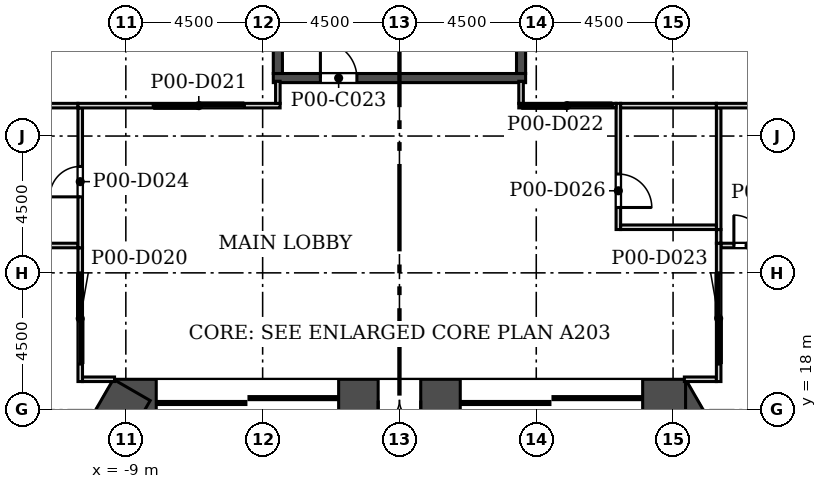
"""IFC4 building model, lengths in metres.
Left out: names, types, materials, properties, quantities, classifications, styles, units other than length and angle.
Written with IfcOpenShell. Run it as: python <this file> out.ifc"""

import sys

from ifc_helpers import new_model, si_unit, direction, frame, frame_2d, origin, place, context, subcontext, project, spatial, rectangle, extrude, element, fill, save


model = new_model("IFC4")
c1 = context("Model", 3, precision=1e-05, world=origin(), true_north=direction((0.0, 1.0)))
c2 = subcontext(c1, "Body", "Model", "MODEL_VIEW")
j1 = project(units=[si_unit("LENGTHUNIT", "METRE"), si_unit("PLANEANGLEUNIT", "RADIAN")], contexts=[c1])
p1 = place(None, origin())
s1 = spatial("IfcSite", under=j1, at=p1, CompositionType="ELEMENT")
p2 = place(p1, origin())
s2 = spatial("IfcBuilding", under=s1, at=p2, CompositionType="ELEMENT")
p3 = place(p2, origin())
s3 = spatial("IfcBuildingStorey", under=s2, at=p3, CompositionType="ELEMENT", Elevation=0.0)
p4 = place(p3, frame((13.394, 10.703, 0.0), z_axis=(0.0, 0.0, 1.0), x_axis=(-0.50000187635, 0.866024320471, 0.0)))
e1 = element("IfcWall", 1, at=p4, inside=s3, PredefinedType="SHEAR", context=c2, shape_type="SweptSolid", body=[
    extrude(rectangle(XDim=9.177, YDim=1.4, at=frame_2d((4.588, 0.0))), origin(), (0.0, 0.0, 1.0), 8.0),
])
p5 = place(p3, frame((9.412, 18.3, 0.0), z_axis=(0.0, 0.0, 1.0), x_axis=(-1.0, 0.0, 0.0)))
e2 = element("IfcWall", 2, at=p5, inside=s3, PredefinedType="SHEAR", context=c2, shape_type="SweptSolid", body=[
    extrude(rectangle(XDim=18.823, YDim=1.4, at=frame_2d((9.412, 0.0))), origin(), (0.0, 0.0, 1.0), 8.0),
])
p6 = place(p5, frame((8.711, 0.0, 0.0)))
e3 = element("IfcOpeningElement", 3, at=p6, cuts=e2, PredefinedType="OPENING", context=c2, shape_type="SweptSolid", body=[
    extrude(rectangle(XDim=1.4, YDim=2.1, at=frame_2d((0.7, 1.05))), frame((0.0, 0.71, 0.0), z_axis=(0.0, -1.0, 0.0), x_axis=(1.0, 0.0, 0.0)), (0.0, 0.0, 1.0), 1.42),
])
p7 = place(p5, frame((11.412, 0.0, 0.0)))
e4 = element("IfcOpeningElement", 4, at=p7, cuts=e2, PredefinedType="OPENING", context=c2, shape_type="SweptSolid", body=[
    extrude(rectangle(XDim=6.0, YDim=2.4, at=frame_2d((3.0, 1.2))), frame((0.0, 0.71, 0.0), z_axis=(0.0, -1.0, 0.0), x_axis=(1.0, 0.0, 0.0)), (0.0, 0.0, 1.0), 1.42),
])
p8 = place(p5, frame((1.412, 0.0, 0.0)))
e5 = element("IfcOpeningElement", 5, at=p8, cuts=e2, PredefinedType="OPENING", context=c2, shape_type="SweptSolid", body=[
    extrude(rectangle(XDim=6.0, YDim=2.4, at=frame_2d((3.0, 1.2))), frame((0.0, 0.71, 0.0), z_axis=(0.0, -1.0, 0.0), x_axis=(1.0, 0.0, 0.0)), (0.0, 0.0, 1.0), 1.42),
])
p9 = place(p3, frame((-8.805, 18.65, 0.0), z_axis=(0.0, 0.0, 1.0), x_axis=(-0.50000187635, -0.866024320471, 0.0)))
e6 = element("IfcWall", 6, at=p9, inside=s3, PredefinedType="SHEAR", context=c2, shape_type="SweptSolid", body=[
    extrude(rectangle(XDim=9.177, YDim=1.4, at=frame_2d((4.588, 0.0))), origin(), (0.0, 0.0, 1.0), 8.0),
])
p10 = place(p3, frame((-4.853, 74.393, 0.0), z_axis=(0.0, 0.0, 1.0), x_axis=(-0.499999725439, -0.866025562302, 0.0)))
e7 = element("IfcWall", 7, at=p10, inside=s3, PredefinedType="SOLIDWALL", context=c2, shape_type="SweptSolid", body=[
    extrude(rectangle(XDim=52.058, YDim=0.34, at=frame_2d((26.029, 0.0))), origin(), (0.0, 0.0, 1.0), 7.7),
])
p11 = place(p10, frame((19.058, 0.0, 0.9)))
e8 = element("IfcOpeningElement", 8, at=p11, cuts=e7, PredefinedType="OPENING", context=c2, shape_type="SweptSolid", body=[
    extrude(rectangle(XDim=1.885, YDim=3.5, at=frame_2d((0.942, 1.75))), frame((0.0, 0.18, 0.0), z_axis=(0.0, -1.0, 0.0), x_axis=(1.0, 0.0, 0.0)), (0.0, 0.0, 1.0), 0.36),
])
p12 = place(p10, frame((22.058, 0.0, 0.9)))
e9 = element("IfcOpeningElement", 9, at=p12, cuts=e7, PredefinedType="OPENING", context=c2, shape_type="SweptSolid", body=[
    extrude(rectangle(XDim=1.885, YDim=3.5, at=frame_2d((0.942, 1.75))), frame((0.0, 0.18, 0.0), z_axis=(0.0, -1.0, 0.0), x_axis=(1.0, 0.0, 0.0)), (0.0, 0.0, 1.0), 0.36),
])
p13 = place(p10, frame((40.058, 0.0, 0.9)))
e10 = element("IfcOpeningElement", 10, at=p13, cuts=e7, PredefinedType="OPENING", context=c2, shape_type="SweptSolid", body=[
    extrude(rectangle(XDim=1.885, YDim=3.5, at=frame_2d((0.942, 1.75))), frame((0.0, 0.18, 0.0), z_axis=(0.0, -1.0, 0.0), x_axis=(1.0, 0.0, 0.0)), (0.0, 0.0, 1.0), 0.36),
])
p14 = place(p10, frame((43.058, 0.0, 0.9)))
e11 = element("IfcOpeningElement", 11, at=p14, cuts=e7, PredefinedType="OPENING", context=c2, shape_type="SweptSolid", body=[
    extrude(rectangle(XDim=1.885, YDim=3.5, at=frame_2d((0.942, 1.75))), frame((0.0, 0.18, 0.0), z_axis=(0.0, -1.0, 0.0), x_axis=(1.0, 0.0, 0.0)), (0.0, 0.0, 1.0), 0.36),
])
p15 = place(p10, frame((48.279, 0.0, 0.0)))
e12 = element("IfcOpeningElement", 12, at=p15, cuts=e7, PredefinedType="OPENING", context=c2, shape_type="SweptSolid", body=[
    extrude(rectangle(XDim=2.4, YDim=2.7, at=frame_2d((1.2, 1.35))), frame((0.0, 0.18, 0.0), z_axis=(0.0, -1.0, 0.0), x_axis=(1.0, 0.0, 0.0)), (0.0, 0.0, 1.0), 0.36),
])
p16 = place(p10, frame((36.8, 0.0, 0.0)))
e13 = element("IfcOpeningElement", 13, at=p16, cuts=e7, PredefinedType="OPENING", context=c2, shape_type="SweptSolid", body=[
    extrude(rectangle(XDim=2.4, YDim=2.7, at=frame_2d((1.2, 1.35))), frame((0.0, 0.18, 0.0), z_axis=(0.0, -1.0, 0.0), x_axis=(1.0, 0.0, 0.0)), (0.0, 0.0, 1.0), 0.36),
])
p17 = place(p10, frame((31.06, 0.0, 0.0)))
e14 = element("IfcOpeningElement", 14, at=p17, cuts=e7, PredefinedType="OPENING", context=c2, shape_type="SweptSolid", body=[
    extrude(rectangle(XDim=2.4, YDim=2.7, at=frame_2d((1.2, 1.35))), frame((0.0, 0.18, 0.0), z_axis=(0.0, -1.0, 0.0), x_axis=(1.0, 0.0, 0.0)), (0.0, 0.0, 1.0), 0.36),
])
p18 = place(p10, frame((25.321, 0.0, 0.0)))
e15 = element("IfcOpeningElement", 15, at=p18, cuts=e7, PredefinedType="OPENING", context=c2, shape_type="SweptSolid", body=[
    extrude(rectangle(XDim=2.4, YDim=2.7, at=frame_2d((1.2, 1.35))), frame((0.0, 0.18, 0.0), z_axis=(0.0, -1.0, 0.0), x_axis=(1.0, 0.0, 0.0)), (0.0, 0.0, 1.0), 0.36),
])
p19 = place(p10, frame((13.842, 0.0, 0.0)))
e16 = element("IfcOpeningElement", 16, at=p19, cuts=e7, PredefinedType="OPENING", context=c2, shape_type="SweptSolid", body=[
    extrude(rectangle(XDim=2.4, YDim=2.7, at=frame_2d((1.2, 1.35))), frame((0.0, 0.18, 0.0), z_axis=(0.0, -1.0, 0.0), x_axis=(1.0, 0.0, 0.0)), (0.0, 0.0, 1.0), 0.36),
])
p20 = place(p10, frame((8.102, 0.0, 0.0)))
e17 = element("IfcOpeningElement", 17, at=p20, cuts=e7, PredefinedType="OPENING", context=c2, shape_type="SweptSolid", body=[
    extrude(rectangle(XDim=2.4, YDim=2.7, at=frame_2d((1.2, 1.35))), frame((0.0, 0.18, 0.0), z_axis=(0.0, -1.0, 0.0), x_axis=(1.0, 0.0, 0.0)), (0.0, 0.0, 1.0), 0.36),
])
p21 = place(p10, frame((2.363, 0.0, 0.0)))
e18 = element("IfcOpeningElement", 18, at=p21, cuts=e7, PredefinedType="OPENING", context=c2, shape_type="SweptSolid", body=[
    extrude(rectangle(XDim=2.4, YDim=2.7, at=frame_2d((1.2, 1.35))), frame((0.0, 0.18, 0.0), z_axis=(0.0, -1.0, 0.0), x_axis=(1.0, 0.0, 0.0)), (0.0, 0.0, 1.0), 0.36),
])
p22 = place(p3, frame((-4.15, 28.907, -0.4), z_axis=(0.0, 0.0, 1.0), x_axis=(1.0, 0.0, 0.0)))
e19 = element("IfcWall", 19, at=p22, inside=s3, PredefinedType="SOLIDWALL", context=c2, shape_type="SweptSolid", body=[
    extrude(rectangle(XDim=8.3, YDim=0.3, at=frame_2d((4.15, 0.0))), origin(), (0.0, 0.0, 1.0), 8.1),
])
p23 = place(p22, frame((1.55, 0.0, 0.4)))
e20 = element("IfcOpeningElement", 20, at=p23, cuts=e19, PredefinedType="OPENING", context=c2, shape_type="SweptSolid", body=[
    extrude(rectangle(XDim=1.2, YDim=2.1, at=frame_2d((0.6, 1.05))), frame((0.0, 0.16, 0.0), z_axis=(0.0, -1.0, 0.0), x_axis=(1.0, 0.0, 0.0)), (0.0, 0.0, 1.0), 0.32),
])
for number, where, z_axis, x_axis in (
    (21, (-4.0, 29.057, -0.4), (0.0, 0.0, 1.0), (0.0, 1.0, 0.0)),
    (22, (4.0, 29.057, -0.4), (0.0, 0.0, 1.0), (0.0, 1.0, 0.0)),
):
    element("IfcWall", number, at=place(p3, frame(where, z_axis=z_axis, x_axis=x_axis)), inside=s3, PredefinedType="SOLIDWALL", context=c2, shape_type="SweptSolid", body=[
        extrude(rectangle(XDim=6.5, YDim=0.3, at=frame_2d((3.25, 0.0))), origin(), (0.0, 0.0, 1.0), 8.1),
    ])
p24 = place(p3, frame((-10.5, 18.925, 0.0), z_axis=(0.0, 0.0, 1.0), x_axis=(0.0, 1.0, 0.0)))
e23 = element("IfcWall", 23, at=p24, inside=s3, PredefinedType="PARTITIONING", context=c2, shape_type="SweptSolid", body=[
    extrude(rectangle(XDim=4.4, YDim=0.15, at=frame_2d((2.2, 0.0))), origin(), (0.0, 0.0, 1.0), 7.7),
])
p25 = place(p24, frame((0.575, 0.0, 0.0)))
e24 = element("IfcOpeningElement", 24, at=p25, cuts=e23, PredefinedType="OPENING", context=c2, shape_type="SweptSolid", body=[
    extrude(rectangle(XDim=3.0, YDim=2.4, at=frame_2d((1.5, 1.2))), frame((0.0, 0.085, 0.0), z_axis=(0.0, -1.0, 0.0), x_axis=(1.0, 0.0, 0.0)), (0.0, 0.0, 1.0), 0.17),
])
for number, where, z_axis, x_axis in (
    (25, (-9.371, 19.0, 0.0), (0.0, 0.0, 1.0), (-1.0, 0.0, 0.0)),
    (26, (10.425, 19.0, 0.0), (0.0, 0.0, 1.0), (-1.0, 0.0, 0.0)),
):
    element("IfcWall", number, at=place(p3, frame(where, z_axis=z_axis, x_axis=x_axis)), inside=s3, PredefinedType="PARTITIONING", context=c2, shape_type="SweptSolid", body=[
        extrude(rectangle(XDim=1.054, YDim=0.15, at=frame_2d((0.527, 0.0))), origin(), (0.0, 0.0, 1.0), 7.7),
    ])
p26 = place(p3, frame((-10.575, 23.4, 0.0), z_axis=(0.0, 0.0, 1.0), x_axis=(-1.0, 0.0, 0.0)))
e27 = element("IfcWall", 27, at=p26, inside=s3, PredefinedType="PARTITIONING", context=c2, shape_type="SweptSolid", body=[
    extrude(rectangle(XDim=2.0, YDim=0.15, at=frame_2d((1.0, 0.0))), origin(), (0.0, 0.0, 1.0), 7.7),
])
p27 = place(p3, frame((12.575, 23.4, 0.0), z_axis=(0.0, 0.0, 1.0), x_axis=(-1.0, 0.0, 0.0)))
e28 = element("IfcWall", 28, at=p27, inside=s3, PredefinedType="PARTITIONING", context=c2, shape_type="SweptSolid", body=[
    extrude(rectangle(XDim=2.0, YDim=0.15, at=frame_2d((1.0, 0.0))), origin(), (0.0, 0.0, 1.0), 7.7),
])
p28 = place(p27, frame((0.575, 0.0, 0.0)))
e29 = element("IfcOpeningElement", 29, at=p28, cuts=e28, PredefinedType="OPENING", context=c2, shape_type="SweptSolid", body=[
    extrude(rectangle(XDim=1.0, YDim=2.1, at=frame_2d((0.5, 1.05))), frame((0.0, 0.085, 0.0), z_axis=(0.0, -1.0, 0.0), x_axis=(1.0, 0.0, 0.0)), (0.0, 0.0, 1.0), 0.17),
])
p29 = place(p3, frame((10.5, 23.475, 0.0), z_axis=(0.0, 0.0, 1.0), x_axis=(0.0, -1.0, 0.0)))
e30 = element("IfcWall", 30, at=p29, inside=s3, PredefinedType="PARTITIONING", context=c2, shape_type="SweptSolid", body=[
    extrude(rectangle(XDim=4.55, YDim=0.15, at=frame_2d((2.275, 0.0))), origin(), (0.0, 0.0, 1.0), 7.7),
])
p30 = place(p29, frame((0.975, 0.0, 0.0)))
e31 = element("IfcOpeningElement", 31, at=p30, cuts=e30, PredefinedType="OPENING", context=c2, shape_type="SweptSolid", body=[
    extrude(rectangle(XDim=3.0, YDim=2.4, at=frame_2d((1.5, 1.2))), frame((0.0, 0.085, 0.0), z_axis=(0.0, -1.0, 0.0), x_axis=(1.0, 0.0, 0.0)), (0.0, 0.0, 1.0), 0.17),
])
p31 = place(p3, frame((10.5, 23.475, 0.0), z_axis=(0.0, 0.0, 1.0), x_axis=(0.0, 1.0, 0.0)))
e32 = element("IfcWall", 32, at=p31, inside=s3, PredefinedType="PARTITIONING", context=c2, shape_type="SweptSolid", body=[
    extrude(rectangle(XDim=0.45, YDim=0.15, at=frame_2d((0.225, 0.0))), origin(), (0.0, 0.0, 1.0), 7.7),
])
p32 = place(p3, frame((7.2, 23.925, 0.0), z_axis=(0.0, 0.0, 1.0), x_axis=(0.0, 1.0, 0.0)))
e33 = element("IfcWall", 33, at=p32, inside=s3, PredefinedType="PARTITIONING", context=c2, shape_type="SweptSolid", body=[
    extrude(rectangle(XDim=4.15, YDim=0.15, at=frame_2d((2.075, 0.0))), origin(), (0.0, 0.0, 1.0), 7.7),
])
p33 = place(p32, frame((0.725, 0.0, 0.0)))
e34 = element("IfcOpeningElement", 34, at=p33, cuts=e33, PredefinedType="OPENING", context=c2, shape_type="SweptSolid", body=[
    extrude(rectangle(XDim=1.1, YDim=2.1, at=frame_2d((0.55, 1.05))), frame((0.0, 0.085, 0.0), z_axis=(0.0, -1.0, 0.0), x_axis=(1.0, 0.0, 0.0)), (0.0, 0.0, 1.0), 0.17),
])
p34 = place(p3, frame((10.5, 23.925, 0.0), z_axis=(0.0, 0.0, 1.0), x_axis=(0.0, 1.0, 0.0)))
e35 = element("IfcWall", 35, at=p34, inside=s3, PredefinedType="PARTITIONING", context=c2, shape_type="SweptSolid", body=[
    extrude(rectangle(XDim=4.0, YDim=0.15, at=frame_2d((2.0, 0.0))), origin(), (0.0, 0.0, 1.0), 7.7),
])
p35 = place(p3, frame((10.425, 24.0, 0.0), z_axis=(0.0, 0.0, 1.0), x_axis=(-1.0, 0.0, 0.0)))
e36 = element("IfcWall", 36, at=p35, inside=s3, PredefinedType="PARTITIONING", context=c2, shape_type="SweptSolid", body=[
    extrude(rectangle(XDim=3.15, YDim=0.15, at=frame_2d((1.575, 0.0))), origin(), (0.0, 0.0, 1.0), 7.7),
])
p36 = place(p3, frame((-10.5, 27.925, 0.0), z_axis=(0.0, 0.0, 1.0), x_axis=(0.0, -1.0, 0.0)))
e37 = element("IfcWall", 37, at=p36, inside=s3, PredefinedType="PARTITIONING", context=c2, shape_type="SweptSolid", body=[
    extrude(rectangle(XDim=4.6, YDim=0.15, at=frame_2d((2.3, 0.0))), origin(), (0.0, 0.0, 1.0), 7.7),
])
p37 = place(p36, frame((1.925, 0.0, 0.0)))
e38 = element("IfcOpeningElement", 38, at=p37, cuts=e37, PredefinedType="OPENING", context=c2, shape_type="SweptSolid", body=[
    extrude(rectangle(XDim=1.0, YDim=2.1, at=frame_2d((0.5, 1.05))), frame((0.0, 0.085, 0.0), z_axis=(0.0, -1.0, 0.0), x_axis=(1.0, 0.0, 0.0)), (0.0, 0.0, 1.0), 0.17),
])
p38 = place(p3, frame((-15.075, 28.0, 0.0), z_axis=(0.0, 0.0, 1.0), x_axis=(1.0, 0.0, 0.0)))
e39 = element("IfcWall", 39, at=p38, inside=s3, PredefinedType="PARTITIONING", context=c2, shape_type="SweptSolid", body=[
    extrude(rectangle(XDim=4.5, YDim=0.15, at=frame_2d((2.25, 0.0))), origin(), (0.0, 0.0, 1.0), 7.7),
])
p39 = place(p3, frame((-10.575, 28.0, 0.0), z_axis=(0.0, 0.0, 1.0), x_axis=(1.0, 0.0, 0.0)))
e40 = element("IfcWall", 40, at=p39, inside=s3, PredefinedType="PARTITIONING", context=c2, shape_type="SweptSolid", body=[
    extrude(rectangle(XDim=6.65, YDim=0.15, at=frame_2d((3.325, 0.0))), origin(), (0.0, 0.0, 1.0), 7.7),
])
p40 = place(p39, frame((2.475, 0.0, 0.0)))
e41 = element("IfcOpeningElement", 41, at=p40, cuts=e40, PredefinedType="OPENING", context=c2, shape_type="SweptSolid", body=[
    extrude(rectangle(XDim=3.0, YDim=2.4, at=frame_2d((1.5, 1.2))), frame((0.0, 0.085, 0.0), z_axis=(0.0, -1.0, 0.0), x_axis=(1.0, 0.0, 0.0)), (0.0, 0.0, 1.0), 0.17),
])
p41 = place(p3, frame((3.925, 28.0, 0.0), z_axis=(0.0, 0.0, 1.0), x_axis=(1.0, 0.0, 0.0)))
e42 = element("IfcWall", 42, at=p41, inside=s3, PredefinedType="PARTITIONING", context=c2, shape_type="SweptSolid", body=[
    extrude(rectangle(XDim=3.2, YDim=0.15, at=frame_2d((1.6, 0.0))), origin(), (0.0, 0.0, 1.0), 7.7),
])
p42 = place(p41, frame((0.08, 0.0, 0.0)))
e43 = element("IfcOpeningElement", 43, at=p42, cuts=e42, PredefinedType="OPENING", context=c2, shape_type="SweptSolid", body=[
    extrude(rectangle(XDim=3.0, YDim=2.4, at=frame_2d((1.5, 1.2))), frame((0.0, 0.085, 0.0), z_axis=(0.0, -1.0, 0.0), x_axis=(1.0, 0.0, 0.0)), (0.0, 0.0, 1.0), 0.17),
])
p43 = place(p3, frame((7.275, 28.0, 0.0), z_axis=(0.0, 0.0, 1.0), x_axis=(1.0, 0.0, 0.0)))
e44 = element("IfcWall", 44, at=p43, inside=s3, PredefinedType="PARTITIONING", context=c2, shape_type="SweptSolid", body=[
    extrude(rectangle(XDim=3.15, YDim=0.15, at=frame_2d((1.575, 0.0))), origin(), (0.0, 0.0, 1.0), 7.7),
])
p44 = place(p3, frame((10.425, 28.0, 0.0), z_axis=(0.0, 0.0, 1.0), x_axis=(1.0, 0.0, 0.0)))
e45 = element("IfcWall", 45, at=p44, inside=s3, PredefinedType="PARTITIONING", context=c2, shape_type="SweptSolid", body=[
    extrude(rectangle(XDim=4.65, YDim=0.15, at=frame_2d((2.325, 0.0))), origin(), (0.0, 0.0, 1.0), 7.7),
])
for number, where, z_axis, x_axis in (
    (46, (-4.0, 28.075, 0.0), (0.0, 0.0, 1.0), (0.0, 1.0, 0.0)),
    (47, (4.0, 28.802, 0.0), (0.0, 0.0, 1.0), (0.0, -1.0, 0.0)),
):
    element("IfcWall", number, at=place(p3, frame(where, z_axis=z_axis, x_axis=x_axis)), inside=s3, PredefinedType="PARTITIONING", context=c2, shape_type="SweptSolid", body=[
        extrude(rectangle(XDim=0.727, YDim=0.15, at=frame_2d((0.364, 0.0))), origin(), (0.0, 0.0, 1.0), 7.7),
    ])
p45 = place(p6, origin())
e48 = element("IfcDoor", 48, at=p45, inside=s3, OperationType="DOUBLE_DOOR_SINGLE_SWING", PredefinedType="DOOR", context=c2, shape_type="SweptSolid", body=[
    extrude(rectangle(XDim=1.4, YDim=2.1, at=frame_2d((0.7, 1.05))), frame((0.0, 0.025, 0.0), z_axis=(0.0, -1.0, 0.0), x_axis=(1.0, 0.0, 0.0)), (0.0, 0.0, 1.0), 0.05),
])
fill(e3, e48)
p46 = place(p7, origin())
e49 = element("IfcDoor", 49, at=p46, inside=s3, OperationType="DOUBLE_DOOR_SLIDING", PredefinedType="DOOR", context=c2, shape_type="SweptSolid", body=[
    extrude(rectangle(XDim=6.0, YDim=2.4, at=frame_2d((3.0, 1.2))), frame((0.0, 0.025, 0.0), z_axis=(0.0, -1.0, 0.0), x_axis=(1.0, 0.0, 0.0)), (0.0, 0.0, 1.0), 0.05),
])
fill(e4, e49)
p47 = place(p8, origin())
e50 = element("IfcDoor", 50, at=p47, inside=s3, OperationType="DOUBLE_DOOR_SLIDING", PredefinedType="DOOR", context=c2, shape_type="SweptSolid", body=[
    extrude(rectangle(XDim=6.0, YDim=2.4, at=frame_2d((3.0, 1.2))), frame((0.0, 0.025, 0.0), z_axis=(0.0, -1.0, 0.0), x_axis=(1.0, 0.0, 0.0)), (0.0, 0.0, 1.0), 0.05),
])
fill(e5, e50)
p48 = place(p23, origin())
e51 = element("IfcDoor", 51, at=p48, inside=s3, OperationType="SINGLE_SWING_LEFT", PredefinedType="DOOR", context=c2, shape_type="SweptSolid", body=[
    extrude(rectangle(XDim=1.2, YDim=2.1, at=frame_2d((0.6, 1.05))), frame((0.0, 0.025, 0.0), z_axis=(0.0, -1.0, 0.0), x_axis=(1.0, 0.0, 0.0)), (0.0, 0.0, 1.0), 0.05),
])
fill(e20, e51)
p49 = place(p25, origin())
e52 = element("IfcDoor", 52, at=p49, inside=s3, OperationType="DOUBLE_DOOR_SLIDING", PredefinedType="DOOR", context=c2, shape_type="SweptSolid", body=[
    extrude(rectangle(XDim=3.0, YDim=2.4, at=frame_2d((1.5, 1.2))), frame((0.0, 0.025, 0.0), z_axis=(0.0, -1.0, 0.0), x_axis=(1.0, 0.0, 0.0)), (0.0, 0.0, 1.0), 0.05),
])
fill(e24, e52)
p50 = place(p40, origin())
e53 = element("IfcDoor", 53, at=p50, inside=s3, OperationType="DOUBLE_DOOR_SLIDING", PredefinedType="DOOR", context=c2, shape_type="SweptSolid", body=[
    extrude(rectangle(XDim=3.0, YDim=2.4, at=frame_2d((1.5, 1.2))), frame((0.0, 0.025, 0.0), z_axis=(0.0, -1.0, 0.0), x_axis=(1.0, 0.0, 0.0)), (0.0, 0.0, 1.0), 0.05),
])
fill(e41, e53)
p51 = place(p42, origin())
e54 = element("IfcDoor", 54, at=p51, inside=s3, OperationType="DOUBLE_DOOR_SLIDING", PredefinedType="DOOR", context=c2, shape_type="SweptSolid", body=[
    extrude(rectangle(XDim=3.0, YDim=2.4, at=frame_2d((1.5, 1.2))), frame((0.0, 0.025, 0.0), z_axis=(0.0, -1.0, 0.0), x_axis=(1.0, 0.0, 0.0)), (0.0, 0.0, 1.0), 0.05),
])
fill(e43, e54)
p52 = place(p30, origin())
e55 = element("IfcDoor", 55, at=p52, inside=s3, OperationType="DOUBLE_DOOR_SLIDING", PredefinedType="DOOR", context=c2, shape_type="SweptSolid", body=[
    extrude(rectangle(XDim=3.0, YDim=2.4, at=frame_2d((1.5, 1.2))), frame((0.0, 0.025, 0.0), z_axis=(0.0, -1.0, 0.0), x_axis=(1.0, 0.0, 0.0)), (0.0, 0.0, 1.0), 0.05),
])
fill(e31, e55)
p53 = place(p37, frame((1.0, 0.0, 0.0), z_axis=(0.0, 0.0, 1.0), x_axis=(-1.0, 0.0, 0.0)))
e56 = element("IfcDoor", 56, at=p53, inside=s3, OperationType="SINGLE_SWING_LEFT", PredefinedType="DOOR", context=c2, shape_type="SweptSolid", body=[
    extrude(rectangle(XDim=1.0, YDim=2.1, at=frame_2d((0.5, 1.05))), frame((0.0, 0.025, 0.0), z_axis=(0.0, -1.0, 0.0), x_axis=(1.0, 0.0, 0.0)), (0.0, 0.0, 1.0), 0.05),
])
fill(e38, e56)
p54 = place(p28, frame((1.0, 0.0, 0.0), z_axis=(0.0, 0.0, 1.0), x_axis=(-1.0, 0.0, 0.0)))
e57 = element("IfcDoor", 57, at=p54, inside=s3, OperationType="SINGLE_SWING_LEFT", PredefinedType="DOOR", context=c2, shape_type="SweptSolid", body=[
    extrude(rectangle(XDim=1.0, YDim=2.1, at=frame_2d((0.5, 1.05))), frame((0.0, 0.025, 0.0), z_axis=(0.0, -1.0, 0.0), x_axis=(1.0, 0.0, 0.0)), (0.0, 0.0, 1.0), 0.05),
])
fill(e29, e57)
p55 = place(p33, frame((1.1, 0.0, 0.0), z_axis=(0.0, 0.0, 1.0), x_axis=(-1.0, 0.0, 0.0)))
e58 = element("IfcDoor", 58, at=p55, inside=s3, OperationType="SINGLE_SWING_RIGHT", PredefinedType="DOOR", context=c2, shape_type="SweptSolid", body=[
    extrude(rectangle(XDim=1.1, YDim=2.1, at=frame_2d((0.55, 1.05))), frame((0.0, 0.025, 0.0), z_axis=(0.0, -1.0, 0.0), x_axis=(1.0, 0.0, 0.0)), (0.0, 0.0, 1.0), 0.05),
])
fill(e34, e58)
save(model, sys.argv[1])
